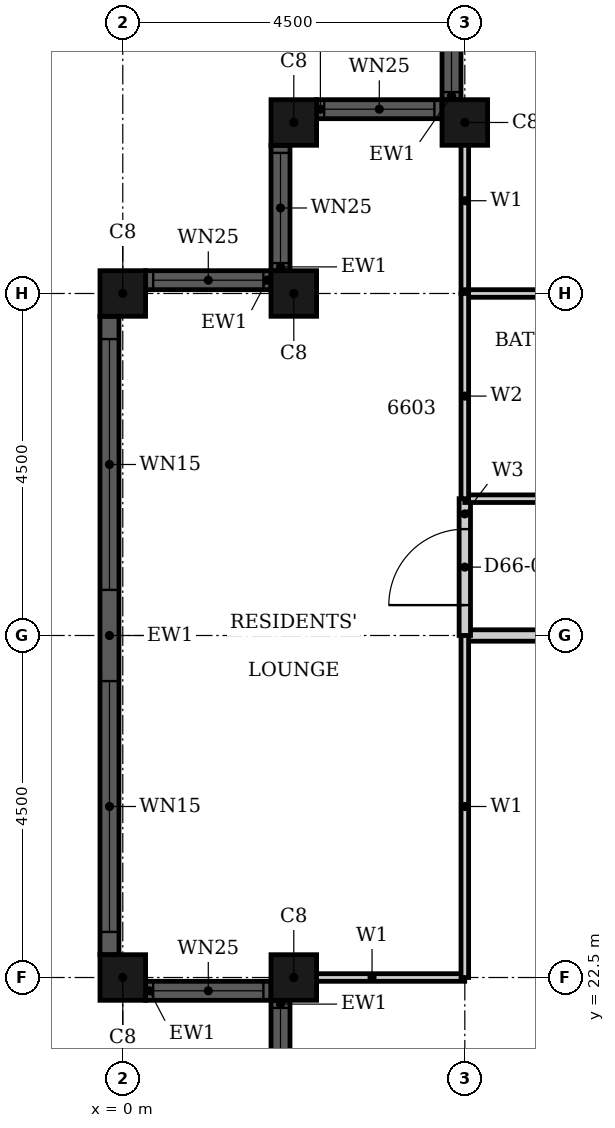
"""IFC4 building model, lengths in metres.
Left out: names, types, materials, properties, quantities, classifications, styles, units other than length and angle.
Written with IfcOpenShell. Run it as: python <this file> out.ifc"""

import sys

from ifc_helpers import new_model, si_unit, direction, frame, frame_2d, origin, origin_2d, place, context, subcontext, project, spatial, rectangle, hollow_rectangle, extrude, element, fill, save


model = new_model("IFC4")
c1 = context("Model", 3, precision=1e-05, world=origin(), true_north=direction((0.0, 1.0)))
c2 = subcontext(c1, "Body", "Model", "MODEL_VIEW")
j1 = project(units=[si_unit("LENGTHUNIT", "METRE"), si_unit("PLANEANGLEUNIT", "RADIAN")], contexts=[c1])
p1 = place(None, origin())
s1 = spatial("IfcSite", under=j1, at=p1, CompositionType="ELEMENT")
p2 = place(p1, origin())
s2 = spatial("IfcBuilding", under=s1, at=p2, CompositionType="ELEMENT")
p3 = place(p2, frame((0.0, 0.0, 260.1)))
s3 = spatial("IfcBuildingStorey", under=s2, at=p3, CompositionType="ELEMENT", Elevation=260.1)
for number, where, z_axis, x_axis in (
    (1, (4.5, 33.75, 0.0), (0.0, 0.0, 1.0), (1.0, 0.0, 0.0)),
    (2, (2.25, 33.75, 0.0), (0.0, 0.0, 1.0), (1.0, 0.0, 0.0)),
    (3, (2.25, 31.5, 0.0), (0.0, 0.0, 1.0), (1.0, 0.0, 0.0)),
    (4, (0.0, 31.5, 0.0), (0.0, 0.0, 1.0), (1.0, 0.0, 0.0)),
    (5, (0.0, 22.5, 0.0), (0.0, 0.0, 1.0), (1.0, 0.0, 0.0)),
    (6, (2.25, 22.5, 0.0), (0.0, 0.0, 1.0), (1.0, 0.0, 0.0)),
):
    element("IfcColumn", number, at=place(p3, frame(where, z_axis=z_axis, x_axis=x_axis)), inside=s3, PredefinedType="COLUMN", context=c2, shape_type="SweptSolid", body=[
        extrude(hollow_rectangle(XDim=0.6, YDim=0.6, WallThickness=0.02, at=origin_2d()), origin(), (0.0, 0.0, 1.0), 3.7),
    ])
p4 = place(p3, frame((4.325, 35.7, 0.0), z_axis=(0.0, 0.0, 1.0), x_axis=(0.0, -1.0, 0.0)))
e7 = element("IfcWall", 7, at=p4, inside=s3, PredefinedType="SOLIDWALL", context=c2, shape_type="SweptSolid", body=[
    extrude(rectangle(XDim=1.65, YDim=0.25, at=frame_2d((0.825, 0.0))), origin(), (0.0, 0.0, 1.0), 3.7),
])
p5 = place(p4, frame((0.1, 0.0, 0.9)))
e8 = element("IfcOpeningElement", 8, at=p5, cuts=e7, PredefinedType="OPENING", context=c2, shape_type="SweptSolid", body=[
    extrude(rectangle(XDim=1.45, YDim=1.85, at=frame_2d((0.725, 0.925))), frame((0.0, 0.135, 0.0), z_axis=(0.0, -1.0, 0.0), x_axis=(1.0, 0.0, 0.0)), (0.0, 0.0, 1.0), 0.27),
])
p6 = place(p3, frame((4.2, 33.925, 0.0), z_axis=(0.0, 0.0, 1.0), x_axis=(-1.0, 0.0, 0.0)))
e9 = element("IfcWall", 9, at=p6, inside=s3, PredefinedType="SOLIDWALL", context=c2, shape_type="SweptSolid", body=[
    extrude(rectangle(XDim=1.65, YDim=0.25, at=frame_2d((0.825, 0.0))), origin(), (0.0, 0.0, 1.0), 3.7),
])
p7 = place(p6, frame((0.1, 0.0, 0.9)))
e10 = element("IfcOpeningElement", 10, at=p7, cuts=e9, PredefinedType="OPENING", context=c2, shape_type="SweptSolid", body=[
    extrude(rectangle(XDim=1.45, YDim=1.85, at=frame_2d((0.725, 0.925))), frame((0.0, 0.135, 0.0), z_axis=(0.0, -1.0, 0.0), x_axis=(1.0, 0.0, 0.0)), (0.0, 0.0, 1.0), 0.27),
])
p8 = place(p3, frame((2.075, 33.45, 0.0), z_axis=(0.0, 0.0, 1.0), x_axis=(0.0, -1.0, 0.0)))
e11 = element("IfcWall", 11, at=p8, inside=s3, PredefinedType="SOLIDWALL", context=c2, shape_type="SweptSolid", body=[
    extrude(rectangle(XDim=1.65, YDim=0.25, at=frame_2d((0.825, 0.0))), origin(), (0.0, 0.0, 1.0), 3.7),
])
p9 = place(p8, frame((0.1, 0.0, 0.9)))
e12 = element("IfcOpeningElement", 12, at=p9, cuts=e11, PredefinedType="OPENING", context=c2, shape_type="SweptSolid", body=[
    extrude(rectangle(XDim=1.45, YDim=1.85, at=frame_2d((0.725, 0.925))), frame((0.0, 0.135, 0.0), z_axis=(0.0, -1.0, 0.0), x_axis=(1.0, 0.0, 0.0)), (0.0, 0.0, 1.0), 0.27),
])
p10 = place(p3, frame((1.95, 31.675, 0.0), z_axis=(0.0, 0.0, 1.0), x_axis=(-1.0, 0.0, 0.0)))
e13 = element("IfcWall", 13, at=p10, inside=s3, PredefinedType="SOLIDWALL", context=c2, shape_type="SweptSolid", body=[
    extrude(rectangle(XDim=1.65, YDim=0.25, at=frame_2d((0.825, 0.0))), origin(), (0.0, 0.0, 1.0), 3.7),
])
p11 = place(p10, frame((0.1, 0.0, 0.9)))
e14 = element("IfcOpeningElement", 14, at=p11, cuts=e13, PredefinedType="OPENING", context=c2, shape_type="SweptSolid", body=[
    extrude(rectangle(XDim=1.45, YDim=1.85, at=frame_2d((0.725, 0.925))), frame((0.0, 0.135, 0.0), z_axis=(0.0, -1.0, 0.0), x_axis=(1.0, 0.0, 0.0)), (0.0, 0.0, 1.0), 0.27),
])
p12 = place(p3, frame((-0.175, 31.2, 0.0), z_axis=(0.0, 0.0, 1.0), x_axis=(0.0, -1.0, 0.0)))
e15 = element("IfcWall", 15, at=p12, inside=s3, PredefinedType="SOLIDWALL", context=c2, shape_type="SweptSolid", body=[
    extrude(rectangle(XDim=8.4, YDim=0.25, at=frame_2d((4.2, 0.0))), origin(), (0.0, 0.0, 1.0), 3.7),
])
p13 = place(p12, frame((0.3, 0.0, 0.45)))
e16 = element("IfcOpeningElement", 16, at=p13, cuts=e15, PredefinedType="OPENING", context=c2, shape_type="SweptSolid", body=[
    extrude(rectangle(XDim=3.3, YDim=2.3, at=frame_2d((1.65, 1.15))), frame((0.0, 0.135, 0.0), z_axis=(0.0, -1.0, 0.0), x_axis=(1.0, 0.0, 0.0)), (0.0, 0.0, 1.0), 0.27),
])
p14 = place(p12, frame((4.8, 0.0, 0.45)))
e17 = element("IfcOpeningElement", 17, at=p14, cuts=e15, PredefinedType="OPENING", context=c2, shape_type="SweptSolid", body=[
    extrude(rectangle(XDim=3.3, YDim=2.3, at=frame_2d((1.65, 1.15))), frame((0.0, 0.135, 0.0), z_axis=(0.0, -1.0, 0.0), x_axis=(1.0, 0.0, 0.0)), (0.0, 0.0, 1.0), 0.27),
])
p15 = place(p3, frame((0.3, 22.325, 0.0), z_axis=(0.0, 0.0, 1.0), x_axis=(1.0, 0.0, 0.0)))
e18 = element("IfcWall", 18, at=p15, inside=s3, PredefinedType="SOLIDWALL", context=c2, shape_type="SweptSolid", body=[
    extrude(rectangle(XDim=1.65, YDim=0.25, at=frame_2d((0.825, 0.0))), origin(), (0.0, 0.0, 1.0), 3.7),
])
p16 = place(p15, frame((0.1, 0.0, 0.9)))
e19 = element("IfcOpeningElement", 19, at=p16, cuts=e18, PredefinedType="OPENING", context=c2, shape_type="SweptSolid", body=[
    extrude(rectangle(XDim=1.45, YDim=1.85, at=frame_2d((0.725, 0.925))), frame((0.0, 0.135, 0.0), z_axis=(0.0, -1.0, 0.0), x_axis=(1.0, 0.0, 0.0)), (0.0, 0.0, 1.0), 0.27),
])
p17 = place(p3, frame((2.075, 22.2, 0.0), z_axis=(0.0, 0.0, 1.0), x_axis=(0.0, -1.0, 0.0)))
e20 = element("IfcWall", 20, at=p17, inside=s3, PredefinedType="SOLIDWALL", context=c2, shape_type="SweptSolid", body=[
    extrude(rectangle(XDim=1.65, YDim=0.25, at=frame_2d((0.825, 0.0))), origin(), (0.0, 0.0, 1.0), 3.7),
])
p18 = place(p17, frame((0.1, 0.0, 0.9)))
e21 = element("IfcOpeningElement", 21, at=p18, cuts=e20, PredefinedType="OPENING", context=c2, shape_type="SweptSolid", body=[
    extrude(rectangle(XDim=1.45, YDim=1.85, at=frame_2d((0.725, 0.925))), frame((0.0, 0.135, 0.0), z_axis=(0.0, -1.0, 0.0), x_axis=(1.0, 0.0, 0.0)), (0.0, 0.0, 1.0), 0.27),
])
p19 = place(p3, frame((4.5, 27.0, 0.0), z_axis=(0.0, 0.0, 1.0), x_axis=(1.0, 0.0, 0.0)))
e22 = element("IfcWall", 22, at=p19, inside=s3, PredefinedType="PARTITIONING", context=c2, shape_type="SweptSolid", body=[
    extrude(rectangle(XDim=13.5, YDim=0.15, at=frame_2d((6.75, 0.0))), origin(), (0.0, 0.0, 1.0), 2.68),
])
p20 = place(p19, frame((5.35, 0.0, 0.0)))
e23 = element("IfcOpeningElement", 23, at=p20, cuts=e22, PredefinedType="OPENING", context=c2, shape_type="SweptSolid", body=[
    extrude(rectangle(XDim=1.0, YDim=2.1, at=frame_2d((0.5, 1.05))), frame((0.0, 0.085, 0.0), z_axis=(0.0, -1.0, 0.0), x_axis=(1.0, 0.0, 0.0)), (0.0, 0.0, 1.0), 0.17),
])
p21 = place(p3, frame((4.5, 27.0, 0.0), z_axis=(0.0, 0.0, 1.0), x_axis=(0.0, 1.0, 0.0)))
e24 = element("IfcWall", 24, at=p21, inside=s3, PredefinedType="PARTITIONING", context=c2, shape_type="SweptSolid", body=[
    extrude(rectangle(XDim=1.8, YDim=0.15, at=frame_2d((0.9, 0.0))), origin(), (0.0, 0.0, 1.0), 3.4),
])
p22 = place(p21, frame((0.4, 0.0, 0.0)))
e25 = element("IfcOpeningElement", 25, at=p22, cuts=e24, PredefinedType="OPENING", context=c2, shape_type="SweptSolid", body=[
    extrude(rectangle(XDim=1.0, YDim=2.1, at=frame_2d((0.5, 1.05))), frame((0.0, 0.085, 0.0), z_axis=(0.0, -1.0, 0.0), x_axis=(1.0, 0.0, 0.0)), (0.0, 0.0, 1.0), 0.17),
])
p23 = place(p3, frame((2.06, 22.5, 0.0), z_axis=(0.0, 0.0, 1.0), x_axis=(1.0, 0.0, 0.0)))
e26 = element("IfcWall", 26, at=p23, inside=s3, PredefinedType="PARTITIONING", context=c2, shape_type="SweptSolid", body=[
    extrude(rectangle(XDim=2.439, YDim=0.1, at=frame_2d((1.219, 0.0))), origin(), (0.0, 0.0, 1.0), 2.68),
])
p24 = place(p3, frame((4.5, 31.501, 0.0), z_axis=(0.0, 0.0, 1.0), x_axis=(0.0, 1.0, 0.0)))
e27 = element("IfcWall", 27, at=p24, inside=s3, PredefinedType="PARTITIONING", context=c2, shape_type="SweptSolid", body=[
    extrude(rectangle(XDim=2.439, YDim=0.1, at=frame_2d((1.219, 0.0))), origin(), (0.0, 0.0, 1.0), 3.4),
])
p25 = place(p3, frame((4.5, 22.5, 0.0), z_axis=(0.0, 0.0, 1.0), x_axis=(0.0, 1.0, 0.0)))
e28 = element("IfcWall", 28, at=p25, inside=s3, PredefinedType="PARTITIONING", context=c2, shape_type="SweptSolid", body=[
    extrude(rectangle(XDim=4.5, YDim=0.1, at=frame_2d((2.25, 0.0))), origin(), (0.0, 0.0, 1.0), 3.4),
])
p26 = place(p3, frame((4.5, 28.8, 0.0), z_axis=(0.0, 0.0, 1.0), x_axis=(1.0, 0.0, 0.0)))
e29 = element("IfcWall", 29, at=p26, inside=s3, PredefinedType="PARTITIONING", context=c2, shape_type="SweptSolid", body=[
    extrude(rectangle(XDim=2.4, YDim=0.1, at=frame_2d((1.2, 0.0))), origin(), (0.0, 0.0, 1.0), 3.4),
])
p27 = place(p3, frame((4.5, 31.5, 0.0), z_axis=(0.0, 0.0, 1.0), x_axis=(1.0, 0.0, 0.0)))
e30 = element("IfcWall", 30, at=p27, inside=s3, PredefinedType="PARTITIONING", context=c2, shape_type="SweptSolid", body=[
    extrude(rectangle(XDim=2.4, YDim=0.1, at=frame_2d((1.2, 0.0))), origin(), (0.0, 0.0, 1.0), 2.68),
])
p28 = place(p3, frame((4.5, 28.8, 0.0), z_axis=(0.0, 0.0, 1.0), x_axis=(0.0, 1.0, 0.0)))
e31 = element("IfcWall", 31, at=p28, inside=s3, PredefinedType="PARTITIONING", context=c2, shape_type="SweptSolid", body=[
    extrude(rectangle(XDim=2.7, YDim=0.1, at=frame_2d((1.35, 0.0))), origin(), (0.0, 0.0, 1.0), 3.4),
])
p29 = place(p5, origin())
e32 = element("IfcWindow", 32, at=p29, inside=s3, PartitioningType="SINGLE_PANEL", PredefinedType="WINDOW", context=c2, shape_type="SweptSolid", body=[
    extrude(rectangle(XDim=1.45, YDim=1.85, at=frame_2d((0.725, 0.925))), frame((0.0, 0.03, 0.0), z_axis=(0.0, -1.0, 0.0), x_axis=(1.0, 0.0, 0.0)), (0.0, 0.0, 1.0), 0.06),
])
fill(e8, e32)
p30 = place(p7, origin())
e33 = element("IfcWindow", 33, at=p30, inside=s3, PartitioningType="SINGLE_PANEL", PredefinedType="WINDOW", context=c2, shape_type="SweptSolid", body=[
    extrude(rectangle(XDim=1.45, YDim=1.85, at=frame_2d((0.725, 0.925))), frame((0.0, 0.03, 0.0), z_axis=(0.0, -1.0, 0.0), x_axis=(1.0, 0.0, 0.0)), (0.0, 0.0, 1.0), 0.06),
])
fill(e10, e33)
p31 = place(p9, origin())
e34 = element("IfcWindow", 34, at=p31, inside=s3, PartitioningType="SINGLE_PANEL", PredefinedType="WINDOW", context=c2, shape_type="SweptSolid", body=[
    extrude(rectangle(XDim=1.45, YDim=1.85, at=frame_2d((0.725, 0.925))), frame((0.0, 0.03, 0.0), z_axis=(0.0, -1.0, 0.0), x_axis=(1.0, 0.0, 0.0)), (0.0, 0.0, 1.0), 0.06),
])
fill(e12, e34)
p32 = place(p11, origin())
e35 = element("IfcWindow", 35, at=p32, inside=s3, PartitioningType="SINGLE_PANEL", PredefinedType="WINDOW", context=c2, shape_type="SweptSolid", body=[
    extrude(rectangle(XDim=1.45, YDim=1.85, at=frame_2d((0.725, 0.925))), frame((0.0, 0.03, 0.0), z_axis=(0.0, -1.0, 0.0), x_axis=(1.0, 0.0, 0.0)), (0.0, 0.0, 1.0), 0.06),
])
fill(e14, e35)
p33 = place(p13, origin())
e36 = element("IfcWindow", 36, at=p33, inside=s3, PartitioningType="SINGLE_PANEL", PredefinedType="WINDOW", context=c2, shape_type="SweptSolid", body=[
    extrude(rectangle(XDim=3.3, YDim=2.3, at=frame_2d((1.65, 1.15))), frame((0.0, 0.03, 0.0), z_axis=(0.0, -1.0, 0.0), x_axis=(1.0, 0.0, 0.0)), (0.0, 0.0, 1.0), 0.06),
])
fill(e16, e36)
p34 = place(p14, origin())
e37 = element("IfcWindow", 37, at=p34, inside=s3, PartitioningType="SINGLE_PANEL", PredefinedType="WINDOW", context=c2, shape_type="SweptSolid", body=[
    extrude(rectangle(XDim=3.3, YDim=2.3, at=frame_2d((1.65, 1.15))), frame((0.0, 0.03, 0.0), z_axis=(0.0, -1.0, 0.0), x_axis=(1.0, 0.0, 0.0)), (0.0, 0.0, 1.0), 0.06),
])
fill(e17, e37)
p35 = place(p16, origin())
e38 = element("IfcWindow", 38, at=p35, inside=s3, PartitioningType="SINGLE_PANEL", PredefinedType="WINDOW", context=c2, shape_type="SweptSolid", body=[
    extrude(rectangle(XDim=1.45, YDim=1.85, at=frame_2d((0.725, 0.925))), frame((0.0, 0.03, 0.0), z_axis=(0.0, -1.0, 0.0), x_axis=(1.0, 0.0, 0.0)), (0.0, 0.0, 1.0), 0.06),
])
fill(e19, e38)
p36 = place(p18, origin())
e39 = element("IfcWindow", 39, at=p36, inside=s3, PartitioningType="SINGLE_PANEL", PredefinedType="WINDOW", context=c2, shape_type="SweptSolid", body=[
    extrude(rectangle(XDim=1.45, YDim=1.85, at=frame_2d((0.725, 0.925))), frame((0.0, 0.03, 0.0), z_axis=(0.0, -1.0, 0.0), x_axis=(1.0, 0.0, 0.0)), (0.0, 0.0, 1.0), 0.06),
])
fill(e21, e39)
p37 = place(p22, origin())
e40 = element("IfcDoor", 40, at=p37, inside=s3, OperationType="SINGLE_SWING_RIGHT", PredefinedType="DOOR", context=c2, shape_type="SweptSolid", body=[
    extrude(rectangle(XDim=1.0, YDim=2.1, at=frame_2d((0.5, 1.05))), frame((0.0, 0.025, 0.0), z_axis=(0.0, -1.0, 0.0), x_axis=(1.0, 0.0, 0.0)), (0.0, 0.0, 1.0), 0.05),
])
fill(e25, e40)
save(model, sys.argv[1])
